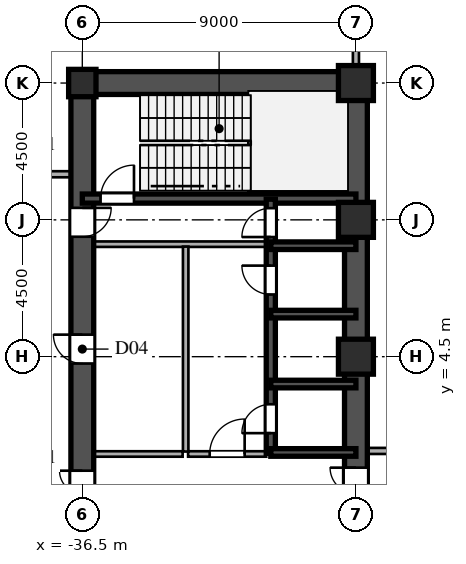
"""IFC4 building model, lengths in metres.
Left out: names, types, materials, properties, quantities, classifications, styles, units other than length and angle.
Written with IfcOpenShell. Run it as: python <this file> out.ifc"""

import sys

from ifc_helpers import new_model, si_unit, direction, frame, frame_2d, origin, origin_2d, place, context, subcontext, project, spatial, rectangle, hollow_rectangle, i_section, extrude, source, transform, mapped, element, fill, save


model = new_model("IFC4")
c1 = context("Model", 3, precision=1e-05, world=origin(), true_north=direction((0.0, 1.0)))
c2 = subcontext(c1, "Body", "Model", "MODEL_VIEW")
j1 = project(units=[si_unit("LENGTHUNIT", "METRE"), si_unit("PLANEANGLEUNIT", "RADIAN")], contexts=[c1])
p1 = place(None, origin())
s1 = spatial("IfcSite", under=j1, at=p1, CompositionType="ELEMENT")
p2 = place(p1, origin())
s2 = spatial("IfcBuilding", under=s1, at=p2, CompositionType="ELEMENT")
p3 = place(p2, frame((0.0, 0.0, -9.6)))
s3 = spatial("IfcBuildingStorey", under=s2, at=p3, CompositionType="ELEMENT", Elevation=-9.6)
m1 = source(origin(), c2, "Body", "SweptSolid", [
    extrude(hollow_rectangle(XDim=1.15, YDim=1.15, WallThickness=0.048, at=origin_2d()), origin(), (0.0, 0.0, 1.0), 4.8),
])
for number, where, z_axis, x_axis in (
    (1, (-27.5, 4.5, 0.0), (0.0, 0.0, 1.0), (1.0, 0.0, 0.0)),
    (2, (-27.5, 9.0, 0.0), (0.0, 0.0, 1.0), (1.0, 0.0, 0.0)),
    (3, (-27.5, 13.5, 0.0), (0.0, 0.0, 1.0), (1.0, 0.0, 0.0)),
):
    element("IfcColumn", number, at=place(p3, frame(where, z_axis=z_axis, x_axis=x_axis)), inside=s3, PredefinedType="COLUMN", context=c2, shape_type="MappedRepresentation", body=[
        mapped(m1, transform((0.0, 0.0, 0.0), scale=1.0)),
    ])
m2 = source(origin(), c2, "Body", "SweptSolid", [
    extrude(i_section(OverallWidth=0.9, OverallDepth=0.9, WebThickness=0.036, FlangeThickness=0.055, at=origin_2d()), origin(), (0.0, 0.0, 1.0), 4.8),
])
p4 = place(p3, frame((-36.5, 13.5, 0.0), z_axis=(0.0, 0.0, 1.0), x_axis=(1.0, 0.0, 0.0)))
e4 = element("IfcColumn", 4, at=p4, inside=s3, PredefinedType="COLUMN", context=c2, shape_type="MappedRepresentation", body=[
    mapped(m2, transform((0.0, 0.0, 0.0), scale=1.0)),
])
p5 = place(p3, frame((-27.5, 1.3, 0.0), z_axis=(0.0, 0.0, 1.0), x_axis=(0.0, 1.0, 0.0)))
e5 = element("IfcWall", 5, at=p5, inside=s3, PredefinedType="SHEAR", context=c2, shape_type="SweptSolid", body=[
    extrude(rectangle(XDim=12.2, YDim=0.75, at=frame_2d((6.1, 0.0))), origin(), (0.0, 0.0, 1.0), 4.5),
])
p6 = place(p3, frame((-27.5, -1.3, 0.0), z_axis=(0.0, 0.0, 1.0), x_axis=(0.0, 1.0, 0.0)))
e6 = element("IfcWall", 6, at=p6, inside=s3, PredefinedType="SHEAR", context=c2, shape_type="SweptSolid", body=[
    extrude(rectangle(XDim=2.6, YDim=0.75, at=frame_2d((1.3, 0.0))), origin(), (0.0, 0.0, 1.0), 4.5),
])
p7 = place(p6, frame((0.45, 0.0, 0.0)))
e7 = element("IfcOpeningElement", 7, at=p7, cuts=e6, PredefinedType="OPENING", context=c2, shape_type="SweptSolid", body=[
    extrude(rectangle(XDim=1.7, YDim=2.35, at=frame_2d((0.85, 1.175))), frame((0.0, 0.385, 0.0), z_axis=(0.0, -1.0, 0.0), x_axis=(1.0, 0.0, 0.0)), (0.0, 0.0, 1.0), 0.77),
])
p8 = place(p3, frame((-36.5, 13.5, 0.0), z_axis=(0.0, 0.0, 1.0), x_axis=(1.0, 0.0, 0.0)))
e8 = element("IfcWall", 8, at=p8, inside=s3, PredefinedType="SHEAR", context=c2, shape_type="SweptSolid", body=[
    extrude(rectangle(XDim=9.0, YDim=0.75, at=frame_2d((4.5, 0.0))), origin(), (0.0, 0.0, 1.0), 4.5),
])
p9 = place(p3, frame((-36.5, -1.3, 0.0), z_axis=(0.0, 0.0, 1.0), x_axis=(0.0, 1.0, 0.0)))
e9 = element("IfcWall", 9, at=p9, inside=s3, PredefinedType="SHEAR", context=c2, shape_type="SweptSolid", body=[
    extrude(rectangle(XDim=2.6, YDim=0.75, at=frame_2d((1.3, 0.0))), origin(), (0.0, 0.0, 1.0), 4.5),
])
p10 = place(p9, frame((0.55, 0.0, 0.0)))
e10 = element("IfcOpeningElement", 10, at=p10, cuts=e9, PredefinedType="OPENING", context=c2, shape_type="SweptSolid", body=[
    extrude(rectangle(XDim=1.5, YDim=2.3, at=frame_2d((0.75, 1.15))), frame((0.0, 0.385, 0.0), z_axis=(0.0, -1.0, 0.0), x_axis=(1.0, 0.0, 0.0)), (0.0, 0.0, 1.0), 0.77),
])
p11 = place(p3, frame((-36.5, 8.2, 0.0), z_axis=(0.0, 0.0, 1.0), x_axis=(0.0, 1.0, 0.0)))
e11 = element("IfcWall", 11, at=p11, inside=s3, PredefinedType="SHEAR", context=c2, shape_type="SweptSolid", body=[
    extrude(rectangle(XDim=5.45, YDim=0.75, at=frame_2d((2.725, 0.0))), origin(), (0.0, 0.0, 1.0), 4.5),
])
p12 = place(p11, frame((0.245, 0.0, 0.0)))
e12 = element("IfcOpeningElement", 12, at=p12, cuts=e11, PredefinedType="OPENING", context=c2, shape_type="SweptSolid", body=[
    extrude(rectangle(XDim=0.95, YDim=2.15, at=frame_2d((0.475, 1.075))), frame((0.0, 0.385, 0.0), z_axis=(0.0, -1.0, 0.0), x_axis=(1.0, 0.0, 0.0)), (0.0, 0.0, 1.0), 0.77),
])
p13 = place(p3, frame((-36.5, 1.3, 0.0), z_axis=(0.0, 0.0, 1.0), x_axis=(0.0, 1.0, 0.0)))
e13 = element("IfcWall", 13, at=p13, inside=s3, PredefinedType="SHEAR", context=c2, shape_type="SweptSolid", body=[
    extrude(rectangle(XDim=6.9, YDim=0.75, at=frame_2d((3.45, 0.0))), origin(), (0.0, 0.0, 1.0), 4.5),
])
p14 = place(p13, frame((2.975, 0.0, 0.0)))
e14 = element("IfcOpeningElement", 14, at=p14, cuts=e13, PredefinedType="OPENING", context=c2, shape_type="SweptSolid", body=[
    extrude(rectangle(XDim=0.95, YDim=2.15, at=frame_2d((0.475, 1.075))), frame((0.0, 0.385, 0.0), z_axis=(0.0, -1.0, 0.0), x_axis=(1.0, 0.0, 0.0)), (0.0, 0.0, 1.0), 0.77),
])
p15 = place(p3, frame((-36.5, 9.7, 0.0), z_axis=(0.0, 0.0, 1.0), x_axis=(1.0, 0.0, 0.0)))
e15 = element("IfcWall", 15, at=p15, inside=s3, PredefinedType="SHEAR", context=c2, shape_type="SweptSolid", body=[
    extrude(rectangle(XDim=9.0, YDim=0.3, at=frame_2d((4.5, 0.0))), origin(), (0.0, 0.0, 1.0), 4.5),
])
p16 = place(p15, frame((0.6, 0.0, 0.0)))
e16 = element("IfcOpeningElement", 16, at=p16, cuts=e15, PredefinedType="OPENING", context=c2, shape_type="SweptSolid", body=[
    extrude(rectangle(XDim=1.1, YDim=2.2, at=frame_2d((0.55, 1.1))), frame((0.0, 0.16, 0.0), z_axis=(0.0, -1.0, 0.0), x_axis=(1.0, 0.0, 0.0)), (0.0, 0.0, 1.0), 0.32),
])
for number, where, z_axis, x_axis in (
    (17, (-30.3, 1.35, 0.0), (0.0, 0.0, 1.0), (1.0, 0.0, 0.0)),
    (18, (-30.3, 3.6, 0.0), (0.0, 0.0, 1.0), (1.0, 0.0, 0.0)),
    (19, (-30.3, 5.9, 0.0), (0.0, 0.0, 1.0), (1.0, 0.0, 0.0)),
    (20, (-30.3, 8.15, 0.0), (0.0, 0.0, 1.0), (1.0, 0.0, 0.0)),
):
    element("IfcWall", number, at=place(p3, frame(where, z_axis=z_axis, x_axis=x_axis)), inside=s3, PredefinedType="SHEAR", context=c2, shape_type="SweptSolid", body=[
        extrude(rectangle(XDim=2.8, YDim=0.25, at=frame_2d((1.4, 0.0))), origin(), (0.0, 0.0, 1.0), 4.5),
    ])
p17 = place(p3, frame((-30.3, 1.32, 0.0), z_axis=(0.0, 0.0, 1.0), x_axis=(0.0, 1.0, 0.0)))
e21 = element("IfcWall", 21, at=p17, inside=s3, PredefinedType="SHEAR", context=c2, shape_type="SweptSolid", body=[
    extrude(rectangle(XDim=2.28, YDim=0.3, at=frame_2d((1.14, 0.0))), origin(), (0.0, 0.0, 1.0), 4.5),
])
p18 = place(p17, frame((0.665, 0.0, 0.0)))
e22 = element("IfcOpeningElement", 22, at=p18, cuts=e21, PredefinedType="OPENING", context=c2, shape_type="SweptSolid", body=[
    extrude(rectangle(XDim=0.95, YDim=2.15, at=frame_2d((0.475, 1.075))), frame((0.0, 0.16, 0.0), z_axis=(0.0, -1.0, 0.0), x_axis=(1.0, 0.0, 0.0)), (0.0, 0.0, 1.0), 0.32),
])
p19 = place(p3, frame((-30.3, 3.6, 0.0), z_axis=(0.0, 0.0, 1.0), x_axis=(0.0, 1.0, 0.0)))
e23 = element("IfcWall", 23, at=p19, inside=s3, PredefinedType="SHEAR", context=c2, shape_type="SweptSolid", body=[
    extrude(rectangle(XDim=2.3, YDim=0.3, at=frame_2d((1.15, 0.0))), origin(), (0.0, 0.0, 1.0), 4.5),
])
p20 = place(p3, frame((-30.3, 5.9, 0.0), z_axis=(0.0, 0.0, 1.0), x_axis=(0.0, 1.0, 0.0)))
e24 = element("IfcWall", 24, at=p20, inside=s3, PredefinedType="SHEAR", context=c2, shape_type="SweptSolid", body=[
    extrude(rectangle(XDim=2.25, YDim=0.3, at=frame_2d((1.125, 0.0))), origin(), (0.0, 0.0, 1.0), 4.5),
])
p21 = place(p20, frame((0.645, 0.0, 0.0)))
e25 = element("IfcOpeningElement", 25, at=p21, cuts=e24, PredefinedType="OPENING", context=c2, shape_type="SweptSolid", body=[
    extrude(rectangle(XDim=0.95, YDim=2.15, at=frame_2d((0.475, 1.075))), frame((0.0, 0.16, 0.0), z_axis=(0.0, -1.0, 0.0), x_axis=(1.0, 0.0, 0.0)), (0.0, 0.0, 1.0), 0.32),
])
p22 = place(p3, frame((-30.3, 8.15, 0.0), z_axis=(0.0, 0.0, 1.0), x_axis=(0.0, 1.0, 0.0)))
e26 = element("IfcWall", 26, at=p22, inside=s3, PredefinedType="SHEAR", context=c2, shape_type="SweptSolid", body=[
    extrude(rectangle(XDim=1.53, YDim=0.3, at=frame_2d((0.765, 0.0))), origin(), (0.0, 0.0, 1.0), 4.5),
])
p23 = place(p22, frame((0.285, 0.0, 0.0)))
e27 = element("IfcOpeningElement", 27, at=p23, cuts=e26, PredefinedType="OPENING", context=c2, shape_type="SweptSolid", body=[
    extrude(rectangle(XDim=0.95, YDim=2.15, at=frame_2d((0.475, 1.075))), frame((0.0, 0.16, 0.0), z_axis=(0.0, -1.0, 0.0), x_axis=(1.0, 0.0, 0.0)), (0.0, 0.0, 1.0), 0.32),
])
p24 = place(p3, frame((-36.15, 8.2, 0.0), z_axis=(0.0, 0.0, 1.0), x_axis=(1.0, 0.0, 0.0)))
e28 = element("IfcWall", 28, at=p24, inside=s3, PredefinedType="PARTITIONING", context=c2, shape_type="SweptSolid", body=[
    extrude(rectangle(XDim=5.7, YDim=0.18, at=frame_2d((2.85, 0.0))), origin(), (0.0, 0.0, 1.0), 4.5),
])
p25 = place(p3, frame((-33.1, 1.38, 0.0), z_axis=(0.0, 0.0, 1.0), x_axis=(0.0, 1.0, 0.0)))
e29 = element("IfcWall", 29, at=p25, inside=s3, PredefinedType="PARTITIONING", context=c2, shape_type="SweptSolid", body=[
    extrude(rectangle(XDim=6.74, YDim=0.18, at=frame_2d((3.37, 0.0))), origin(), (0.0, 0.0, 1.0), 4.5),
])
p26 = place(p3, frame((-33.02, 1.3, 0.0), z_axis=(0.0, 0.0, 1.0), x_axis=(1.0, 0.0, 0.0)))
e30 = element("IfcWall", 30, at=p26, inside=s3, PredefinedType="PARTITIONING", context=c2, shape_type="SweptSolid", body=[
    extrude(rectangle(XDim=2.57, YDim=0.18, at=frame_2d((1.285, 0.0))), origin(), (0.0, 0.0, 1.0), 4.5),
])
p27 = place(p26, frame((0.71, 0.0, 0.0)))
e31 = element("IfcOpeningElement", 31, at=p27, cuts=e30, PredefinedType="OPENING", context=c2, shape_type="SweptSolid", body=[
    extrude(rectangle(XDim=1.15, YDim=2.2, at=frame_2d((0.575, 1.1))), frame((0.0, 0.1, 0.0), z_axis=(0.0, -1.0, 0.0), x_axis=(1.0, 0.0, 0.0)), (0.0, 0.0, 1.0), 0.2),
])
p28 = place(p3, frame((-36.15, 1.3, 0.0), z_axis=(0.0, 0.0, 1.0), x_axis=(1.0, 0.0, 0.0)))
e32 = element("IfcWall", 32, at=p28, inside=s3, PredefinedType="PARTITIONING", context=c2, shape_type="SweptSolid", body=[
    extrude(rectangle(XDim=2.95, YDim=0.18, at=frame_2d((1.475, 0.0))), origin(), (0.0, 0.0, 1.0), 4.5),
])
p29 = place(p3, frame((-27.12, 1.4, 0.0), z_axis=(0.0, 0.0, 1.0), x_axis=(1.0, 0.0, 0.0)))
e33 = element("IfcWall", 33, at=p29, inside=s3, PredefinedType="PARTITIONING", context=c2, shape_type="SweptSolid", body=[
    extrude(rectangle(XDim=54.24, YDim=0.2, at=frame_2d((27.12, 0.0))), origin(), (0.0, 0.0, 1.0), 4.5),
])
p30 = place(p29, frame((19.545, 0.0, 0.0)))
e34 = element("IfcOpeningElement", 34, at=p30, cuts=e33, PredefinedType="OPENING", context=c2, shape_type="SweptSolid", body=[
    extrude(rectangle(XDim=1.15, YDim=2.2, at=frame_2d((0.575, 1.1))), frame((0.0, 0.11, 0.0), z_axis=(0.0, -1.0, 0.0), x_axis=(1.0, 0.0, 0.0)), (0.0, 0.0, 1.0), 0.22),
])
p31 = place(p29, frame((46.93, 0.0, 0.0)))
e35 = element("IfcOpeningElement", 35, at=p31, cuts=e33, PredefinedType="OPENING", context=c2, shape_type="SweptSolid", body=[
    extrude(rectangle(XDim=0.88, YDim=2.1, at=frame_2d((0.44, 1.05))), frame((0.0, 0.11, 0.0), z_axis=(0.0, -1.0, 0.0), x_axis=(1.0, 0.0, 0.0)), (0.0, 0.0, 1.0), 0.22),
])
p32 = place(p3, frame((-38.915, 10.5, 0.0), z_axis=(0.0, 0.0, 1.0), x_axis=(1.0, 0.0, 0.0)))
e36 = element("IfcWall", 36, at=p32, inside=s3, PredefinedType="PARTITIONING", context=c2, shape_type="SweptSolid", body=[
    extrude(rectangle(XDim=2.035, YDim=0.2, at=frame_2d((1.018, 0.0))), origin(), (0.0, 0.0, 1.0), 4.5),
])
p33 = place(p3, frame((-27.5, 13.88, 0.0), z_axis=(0.0, 0.0, 1.0), x_axis=(0.0, 1.0, 0.0)))
e37 = element("IfcWall", 37, at=p33, inside=s3, PredefinedType="PARTITIONING", context=c2, shape_type="SweptSolid", body=[
    extrude(rectangle(XDim=7.933, YDim=0.2, at=frame_2d((3.966, 0.0))), origin(), (0.0, 0.0, 1.0), 3.912),
])
m3 = source(origin(), c2, "Body", "SweptSolid", [
    extrude(rectangle(XDim=1.7, YDim=2.35, at=frame_2d((0.85, 1.175))), frame((0.0, 0.025, 0.0), z_axis=(0.0, -1.0, 0.0), x_axis=(1.0, 0.0, 0.0)), (0.0, 0.0, 1.0), 0.05),
])
p34 = place(p7, origin())
e38 = element("IfcDoor", 38, at=p34, inside=s3, OperationType="DOUBLE_SWING_LEFT", PredefinedType="DOOR", context=c2, shape_type="MappedRepresentation", body=[
    mapped(m3, transform((0.0, 0.0, 0.0), scale=1.0)),
])
fill(e7, e38)
m4 = source(origin(), c2, "Body", "SweptSolid", [
    extrude(rectangle(XDim=1.5, YDim=2.3, at=frame_2d((0.75, 1.15))), frame((0.0, 0.025, 0.0), z_axis=(0.0, -1.0, 0.0), x_axis=(1.0, 0.0, 0.0)), (0.0, 0.0, 1.0), 0.05),
])
p35 = place(p10, origin())
e39 = element("IfcDoor", 39, at=p35, inside=s3, OperationType="DOUBLE_SWING_LEFT", PredefinedType="DOOR", context=c2, shape_type="MappedRepresentation", body=[
    mapped(m4, transform((0.0, 0.0, 0.0), scale=1.0)),
])
fill(e10, e39)
m5 = source(origin(), c2, "Body", "SweptSolid", [
    extrude(rectangle(XDim=0.95, YDim=2.15, at=frame_2d((0.475, 1.075))), frame((0.0, 0.025, 0.0), z_axis=(0.0, -1.0, 0.0), x_axis=(1.0, 0.0, 0.0)), (0.0, 0.0, 1.0), 0.05),
])
p36 = place(p12, frame((0.95, 0.0, 0.0), z_axis=(0.0, 0.0, 1.0), x_axis=(-1.0, 0.0, 0.0)))
e40 = element("IfcDoor", 40, at=p36, inside=s3, OperationType="SINGLE_SWING_RIGHT", PredefinedType="DOOR", context=c2, shape_type="MappedRepresentation", body=[
    mapped(m5, transform((0.0, 0.0, 0.0), scale=1.0)),
])
fill(e12, e40)
p37 = place(p14, origin())
e41 = element("IfcDoor", 41, at=p37, inside=s3, OperationType="SINGLE_SWING_RIGHT", PredefinedType="DOOR", context=c2, shape_type="MappedRepresentation", body=[
    mapped(m5, transform((0.0, 0.0, 0.0), scale=1.0)),
])
fill(e14, e41)
m6 = source(origin(), c2, "Body", "SweptSolid", [
    extrude(rectangle(XDim=1.1, YDim=2.2, at=frame_2d((0.55, 1.1))), frame((0.0, 0.025, 0.0), z_axis=(0.0, -1.0, 0.0), x_axis=(1.0, 0.0, 0.0)), (0.0, 0.0, 1.0), 0.05),
])
p38 = place(p16, origin())
e42 = element("IfcDoor", 42, at=p38, inside=s3, OperationType="SINGLE_SWING_RIGHT", PredefinedType="DOOR", context=c2, shape_type="MappedRepresentation", body=[
    mapped(m6, transform((0.0, 0.0, 0.0), scale=1.0)),
])
fill(e16, e42)
p39 = place(p18, origin())
e43 = element("IfcDoor", 43, at=p39, inside=s3, OperationType="SINGLE_SWING_LEFT", PredefinedType="DOOR", context=c2, shape_type="MappedRepresentation", body=[
    mapped(m5, transform((0.0, 0.0, 0.0), scale=1.0)),
])
fill(e22, e43)
p40 = place(p21, origin())
e44 = element("IfcDoor", 44, at=p40, inside=s3, OperationType="SINGLE_SWING_RIGHT", PredefinedType="DOOR", context=c2, shape_type="MappedRepresentation", body=[
    mapped(m5, transform((0.0, 0.0, 0.0), scale=1.0)),
])
fill(e25, e44)
p41 = place(p23, origin())
e45 = element("IfcDoor", 45, at=p41, inside=s3, OperationType="SINGLE_SWING_LEFT", PredefinedType="DOOR", context=c2, shape_type="MappedRepresentation", body=[
    mapped(m5, transform((0.0, 0.0, 0.0), scale=1.0)),
])
fill(e27, e45)
m7 = source(origin(), c2, "Body", "SweptSolid", [
    extrude(rectangle(XDim=1.15, YDim=2.2, at=frame_2d((0.575, 1.1))), frame((0.0, 0.025, 0.0), z_axis=(0.0, -1.0, 0.0), x_axis=(1.0, 0.0, 0.0)), (0.0, 0.0, 1.0), 0.05),
])
p42 = place(p27, origin())
e46 = element("IfcDoor", 46, at=p42, inside=s3, OperationType="SINGLE_SWING_RIGHT", PredefinedType="DOOR", context=c2, shape_type="MappedRepresentation", body=[
    mapped(m7, transform((0.0, 0.0, 0.0), scale=1.0)),
])
fill(e31, e46)
save(model, sys.argv[1])
